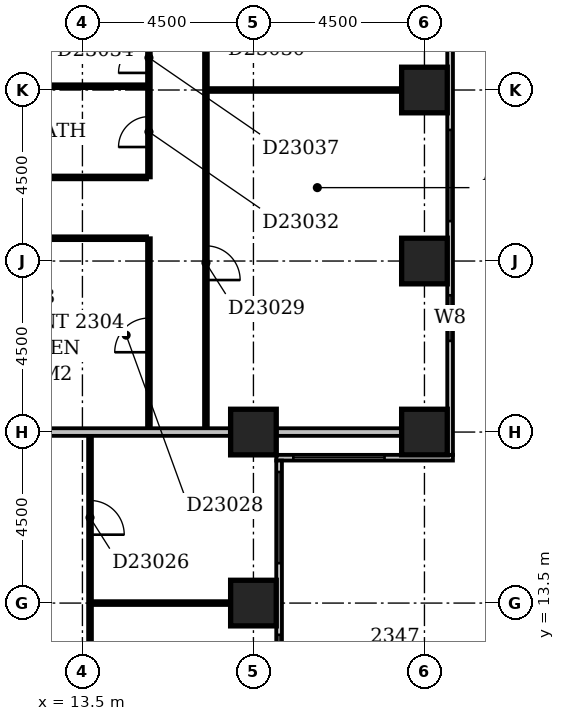
"""IFC4 building model, lengths in metres.
Left out: names, types, materials, properties, quantities, classifications, styles, units other than length and angle.
Written with IfcOpenShell. Run it as: python <this file> out.ifc"""

import sys

from ifc_helpers import new_model, si_unit, direction, frame, frame_2d, origin, origin_2d, place, context, subcontext, project, spatial, rectangle, extrude, element, fill, save


model = new_model("IFC4")
c1 = context("Model", 3, precision=1e-05, world=origin(), true_north=direction((0.0, 1.0)))
c2 = subcontext(c1, "Body", "Model", "MODEL_VIEW")
j1 = project(units=[si_unit("LENGTHUNIT", "METRE"), si_unit("PLANEANGLEUNIT", "RADIAN")], contexts=[c1])
p1 = place(None, origin())
s1 = spatial("IfcSite", under=j1, at=p1, CompositionType="ELEMENT")
p2 = place(p1, origin())
s2 = spatial("IfcBuilding", under=s1, at=p2, CompositionType="ELEMENT")
p3 = place(p2, frame((0.0, 0.0, 93.8)))
s3 = spatial("IfcBuildingStorey", under=s2, at=p3, CompositionType="ELEMENT", Elevation=93.8)
for number, where, z_axis, x_axis in (
    (1, (18.0, 13.5, -0.3), (0.0, 0.0, 1.0), (1.0, 0.0, 0.0)),
    (2, (18.0, 18.0, -0.3), (0.0, 0.0, 1.0), (1.0, 0.0, 0.0)),
    (3, (22.5, 18.0, -0.3), (0.0, 0.0, 1.0), (1.0, 0.0, 0.0)),
    (4, (22.5, 22.5, -0.3), (0.0, 0.0, 1.0), (1.0, 0.0, 0.0)),
    (5, (22.5, 27.0, -0.3), (0.0, 0.0, 1.0), (1.0, 0.0, 0.0)),
):
    element("IfcColumn", number, at=place(p3, frame(where, z_axis=z_axis, x_axis=x_axis)), inside=s3, PredefinedType="COLUMN", context=c2, shape_type="SweptSolid", body=[
        extrude(rectangle(XDim=1.2, YDim=1.2, at=origin_2d()), origin(), (0.0, 0.0, 1.0), 3.6),
    ])
p4 = place(p3, frame((18.675, 8.4, 0.0), z_axis=(0.0, 0.0, 1.0), x_axis=(0.0, 1.0, 0.0)))
e6 = element("IfcWall", 6, at=p4, inside=s3, PredefinedType="STANDARD", context=c2, shape_type="SweptSolid", body=[
    extrude(rectangle(XDim=8.85, YDim=0.15, at=frame_2d((4.425, 0.0))), origin(), (0.0, 0.0, 1.0), 2.7),
])
p5 = place(p4, frame((1.865, 0.0, 0.6)))
e7 = element("IfcOpeningElement", 7, at=p5, cuts=e6, PredefinedType="OPENING", context=c2, shape_type="SweptSolid", body=[
    extrude(rectangle(XDim=2.4, YDim=1.8, at=frame_2d((1.2, 0.9))), frame((0.0, 0.087, 0.0), z_axis=(0.0, -1.0, 0.0), x_axis=(1.0, 0.0, 0.0)), (0.0, 0.0, 1.0), 0.174),
])
p6 = place(p4, frame((6.15, 0.0, 0.6)))
e8 = element("IfcOpeningElement", 8, at=p6, cuts=e6, PredefinedType="OPENING", context=c2, shape_type="SweptSolid", body=[
    extrude(rectangle(XDim=2.4, YDim=1.8, at=frame_2d((1.2, 0.9))), frame((0.0, 0.087, 0.0), z_axis=(0.0, -1.0, 0.0), x_axis=(1.0, 0.0, 0.0)), (0.0, 0.0, 1.0), 0.174),
])
p7 = place(p3, frame((18.6, 17.325, 0.0), z_axis=(0.0, 0.0, 1.0), x_axis=(1.0, 0.0, 0.0)))
e9 = element("IfcWall", 9, at=p7, inside=s3, PredefinedType="STANDARD", context=c2, shape_type="SweptSolid", body=[
    extrude(rectangle(XDim=4.65, YDim=0.15, at=frame_2d((2.325, 0.0))), origin(), (0.0, 0.0, 1.0), 2.7),
])
p8 = place(p7, frame((0.45, 0.0, 0.6)))
e10 = element("IfcOpeningElement", 10, at=p8, cuts=e9, PredefinedType="OPENING", context=c2, shape_type="SweptSolid", body=[
    extrude(rectangle(XDim=2.4, YDim=1.8, at=frame_2d((1.2, 0.9))), frame((0.0, 0.087, 0.0), z_axis=(0.0, -1.0, 0.0), x_axis=(1.0, 0.0, 0.0)), (0.0, 0.0, 1.0), 0.174),
])
p9 = place(p3, frame((23.175, 17.4, 0.0), z_axis=(0.0, 0.0, 1.0), x_axis=(0.0, 1.0, 0.0)))
e11 = element("IfcWall", 11, at=p9, inside=s3, PredefinedType="STANDARD", context=c2, shape_type="SweptSolid", body=[
    extrude(rectangle(XDim=17.85, YDim=0.15, at=frame_2d((8.925, 0.0))), origin(), (0.0, 0.0, 1.0), 2.7),
])
p10 = place(p9, frame((2.999, 0.0, 0.6)))
e12 = element("IfcOpeningElement", 12, at=p10, cuts=e11, PredefinedType="OPENING", context=c2, shape_type="SweptSolid", body=[
    extrude(rectangle(XDim=1.2, YDim=1.8, at=frame_2d((0.6, 0.9))), frame((0.0, 0.087, 0.0), z_axis=(0.0, -1.0, 0.0), x_axis=(1.0, 0.0, 0.0)), (0.0, 0.0, 1.0), 0.174),
])
p11 = place(p9, frame((6.15, 0.0, 0.6)))
e13 = element("IfcOpeningElement", 13, at=p11, cuts=e11, PredefinedType="OPENING", context=c2, shape_type="SweptSolid", body=[
    extrude(rectangle(XDim=2.4, YDim=1.8, at=frame_2d((1.2, 0.9))), frame((0.0, 0.087, 0.0), z_axis=(0.0, -1.0, 0.0), x_axis=(1.0, 0.0, 0.0)), (0.0, 0.0, 1.0), 0.174),
])
p12 = place(p9, frame((10.65, 0.0, 0.6)))
e14 = element("IfcOpeningElement", 14, at=p12, cuts=e11, PredefinedType="OPENING", context=c2, shape_type="SweptSolid", body=[
    extrude(rectangle(XDim=2.4, YDim=1.8, at=frame_2d((1.2, 0.9))), frame((0.0, 0.087, 0.0), z_axis=(0.0, -1.0, 0.0), x_axis=(1.0, 0.0, 0.0)), (0.0, 0.0, 1.0), 0.174),
])
p13 = place(p9, frame((15.043, 0.0, 0.6)))
e15 = element("IfcOpeningElement", 15, at=p13, cuts=e11, PredefinedType="OPENING", context=c2, shape_type="SweptSolid", body=[
    extrude(rectangle(XDim=2.1, YDim=1.8, at=frame_2d((1.05, 0.9))), frame((0.0, 0.087, 0.0), z_axis=(0.0, -1.0, 0.0), x_axis=(1.0, 0.0, 0.0)), (0.0, 0.0, 1.0), 0.174),
])
p14 = place(p3, frame((13.7, 9.6, 0.0), z_axis=(0.0, 0.0, 1.0), x_axis=(0.0, 1.0, 0.0)))
e16 = element("IfcWall", 16, at=p14, inside=s3, PredefinedType="PARTITIONING", context=c2, shape_type="SweptSolid", body=[
    extrude(rectangle(XDim=8.3, YDim=0.1, at=frame_2d((4.15, 0.0))), origin(), (0.0, 0.0, 1.0), 3.3),
])
p15 = place(p14, frame((1.2, 0.0, 0.0)))
e17 = element("IfcOpeningElement", 17, at=p15, cuts=e16, PredefinedType="OPENING", context=c2, shape_type="SweptSolid", body=[
    extrude(rectangle(XDim=0.9, YDim=2.1, at=frame_2d((0.45, 1.05))), frame((0.0, 0.062, 0.0), z_axis=(0.0, -1.0, 0.0), x_axis=(1.0, 0.0, 0.0)), (0.0, 0.0, 1.0), 0.124),
])
p16 = place(p14, frame((5.7, 0.0, 0.0)))
e18 = element("IfcOpeningElement", 18, at=p16, cuts=e16, PredefinedType="OPENING", context=c2, shape_type="SweptSolid", body=[
    extrude(rectangle(XDim=0.9, YDim=2.1, at=frame_2d((0.45, 1.05))), frame((0.0, 0.062, 0.0), z_axis=(0.0, -1.0, 0.0), x_axis=(1.0, 0.0, 0.0)), (0.0, 0.0, 1.0), 0.124),
])
p17 = place(p3, frame((13.75, 13.5, 0.0), z_axis=(0.0, 0.0, 1.0), x_axis=(1.0, 0.0, 0.0)))
e19 = element("IfcWall", 19, at=p17, inside=s3, PredefinedType="PARTITIONING", context=c2, shape_type="SweptSolid", body=[
    extrude(rectangle(XDim=3.65, YDim=0.1, at=frame_2d((1.825, 0.0))), origin(), (0.0, 0.0, 1.0), 3.3),
])
p18 = place(p3, frame((9.1, 18.0, 0.0), z_axis=(0.0, 0.0, 1.0), x_axis=(1.0, 0.0, 0.0)))
e20 = element("IfcWall", 20, at=p18, inside=s3, PredefinedType="PARTITIONING", context=c2, shape_type="SweptSolid", body=[
    extrude(rectangle(XDim=8.3, YDim=0.2, at=frame_2d((4.15, 0.0))), origin(), (0.0, 0.0, 1.0), 2.6),
])
p19 = place(p3, frame((18.6, 18.0, 0.0), z_axis=(0.0, 0.0, 1.0), x_axis=(1.0, 0.0, 0.0)))
e21 = element("IfcWall", 21, at=p19, inside=s3, PredefinedType="PARTITIONING", context=c2, shape_type="SweptSolid", body=[
    extrude(rectangle(XDim=3.3, YDim=0.2, at=frame_2d((1.65, 0.0))), origin(), (0.0, 0.0, 1.0), 2.7),
])
p20 = place(p3, frame((15.25, 18.1, 0.0), z_axis=(0.0, 0.0, 1.0), x_axis=(0.0, 1.0, 0.0)))
e22 = element("IfcWall", 22, at=p20, inside=s3, PredefinedType="PARTITIONING", context=c2, shape_type="SweptSolid", body=[
    extrude(rectangle(XDim=5.0, YDim=0.1, at=frame_2d((2.5, 0.0))), origin(), (0.0, 0.0, 1.0), 3.3),
])
p21 = place(p20, frame((2.0, 0.0, 0.0)))
e23 = element("IfcOpeningElement", 23, at=p21, cuts=e22, PredefinedType="OPENING", context=c2, shape_type="SweptSolid", body=[
    extrude(rectangle(XDim=0.9, YDim=2.1, at=frame_2d((0.45, 1.05))), frame((0.0, 0.062, 0.0), z_axis=(0.0, -1.0, 0.0), x_axis=(1.0, 0.0, 0.0)), (0.0, 0.0, 1.0), 0.124),
])
p22 = place(p3, frame((16.75, 18.1, 0.0), z_axis=(0.0, 0.0, 1.0), x_axis=(0.0, 1.0, 0.0)))
e24 = element("IfcWall", 24, at=p22, inside=s3, PredefinedType="PARTITIONING", context=c2, shape_type="SweptSolid", body=[
    extrude(rectangle(XDim=17.8, YDim=0.1, at=frame_2d((8.9, 0.0))), origin(), (0.0, 0.0, 1.0), 3.3),
])
p23 = place(p22, frame((3.9, 0.0, 0.0)))
e25 = element("IfcOpeningElement", 25, at=p23, cuts=e24, PredefinedType="OPENING", context=c2, shape_type="SweptSolid", body=[
    extrude(rectangle(XDim=0.9, YDim=2.1, at=frame_2d((0.45, 1.05))), frame((0.0, 0.062, 0.0), z_axis=(0.0, -1.0, 0.0), x_axis=(1.0, 0.0, 0.0)), (0.0, 0.0, 1.0), 0.124),
])
p24 = place(p22, frame((10.7, 0.0, 0.0)))
e26 = element("IfcOpeningElement", 26, at=p24, cuts=e24, PredefinedType="OPENING", context=c2, shape_type="SweptSolid", body=[
    extrude(rectangle(XDim=0.9, YDim=2.1, at=frame_2d((0.45, 1.05))), frame((0.0, 0.062, 0.0), z_axis=(0.0, -1.0, 0.0), x_axis=(1.0, 0.0, 0.0)), (0.0, 0.0, 1.0), 0.124),
])
p25 = place(p22, frame((14.05, 0.0, 0.0)))
e27 = element("IfcOpeningElement", 27, at=p25, cuts=e24, PredefinedType="OPENING", context=c2, shape_type="SweptSolid", body=[
    extrude(rectangle(XDim=0.9, YDim=2.1, at=frame_2d((0.45, 1.05))), frame((0.0, 0.062, 0.0), z_axis=(0.0, -1.0, 0.0), x_axis=(1.0, 0.0, 0.0)), (0.0, 0.0, 1.0), 0.124),
])
p26 = place(p3, frame((9.1, 23.1, 0.0), z_axis=(0.0, 0.0, 1.0), x_axis=(1.0, 0.0, 0.0)))
e28 = element("IfcWall", 28, at=p26, inside=s3, PredefinedType="PARTITIONING", context=c2, shape_type="SweptSolid", body=[
    extrude(rectangle(XDim=6.1, YDim=0.1, at=frame_2d((3.05, 0.0))), origin(), (0.0, 0.0, 1.0), 3.3),
])
p27 = place(p3, frame((9.1, 24.7, 0.0), z_axis=(0.0, 0.0, 1.0), x_axis=(1.0, 0.0, 0.0)))
e29 = element("IfcWall", 29, at=p27, inside=s3, PredefinedType="PLUMBINGWALL", context=c2, shape_type="SweptSolid", body=[
    extrude(rectangle(XDim=6.1, YDim=0.1, at=frame_2d((3.05, 0.0))), origin(), (0.0, 0.0, 1.0), 3.3),
])
p28 = place(p3, frame((15.25, 24.7, 0.0), z_axis=(0.0, 0.0, 1.0), x_axis=(0.0, 1.0, 0.0)))
e30 = element("IfcWall", 30, at=p28, inside=s3, PredefinedType="PARTITIONING", context=c2, shape_type="SweptSolid", body=[
    extrude(rectangle(XDim=11.2, YDim=0.1, at=frame_2d((5.6, 0.0))), origin(), (0.0, 0.0, 1.0), 3.3),
])
p29 = place(p28, frame((0.8, 0.0, 0.0)))
e31 = element("IfcOpeningElement", 31, at=p29, cuts=e30, PredefinedType="OPENING", context=c2, shape_type="SweptSolid", body=[
    extrude(rectangle(XDim=0.8, YDim=2.1, at=frame_2d((0.4, 1.05))), frame((0.0, 0.062, 0.0), z_axis=(0.0, -1.0, 0.0), x_axis=(1.0, 0.0, 0.0)), (0.0, 0.0, 1.0), 0.124),
])
p30 = place(p28, frame((8.1, 0.0, 0.0)))
e32 = element("IfcOpeningElement", 32, at=p30, cuts=e30, PredefinedType="OPENING", context=c2, shape_type="SweptSolid", body=[
    extrude(rectangle(XDim=0.8, YDim=2.1, at=frame_2d((0.4, 1.05))), frame((0.0, 0.062, 0.0), z_axis=(0.0, -1.0, 0.0), x_axis=(1.0, 0.0, 0.0)), (0.0, 0.0, 1.0), 0.124),
])
p31 = place(p28, frame((4.3, 0.0, 0.0)))
e33 = element("IfcOpeningElement", 33, at=p31, cuts=e30, PredefinedType="OPENING", context=c2, shape_type="SweptSolid", body=[
    extrude(rectangle(XDim=0.8, YDim=2.1, at=frame_2d((0.4, 1.05))), frame((0.0, 0.062, 0.0), z_axis=(0.0, -1.0, 0.0), x_axis=(1.0, 0.0, 0.0)), (0.0, 0.0, 1.0), 0.124),
])
p32 = place(p28, frame((6.1, 0.0, 0.0)))
e34 = element("IfcOpeningElement", 34, at=p32, cuts=e30, PredefinedType="OPENING", context=c2, shape_type="SweptSolid", body=[
    extrude(rectangle(XDim=0.8, YDim=2.1, at=frame_2d((0.4, 1.05))), frame((0.0, 0.062, 0.0), z_axis=(0.0, -1.0, 0.0), x_axis=(1.0, 0.0, 0.0)), (0.0, 0.0, 1.0), 0.124),
])
p33 = place(p28, frame((10.0, 0.0, 0.0)))
e35 = element("IfcOpeningElement", 35, at=p33, cuts=e30, PredefinedType="OPENING", context=c2, shape_type="SweptSolid", body=[
    extrude(rectangle(XDim=0.8, YDim=2.1, at=frame_2d((0.4, 1.05))), frame((0.0, 0.062, 0.0), z_axis=(0.0, -1.0, 0.0), x_axis=(1.0, 0.0, 0.0)), (0.0, 0.0, 1.0), 0.124),
])
p34 = place(p28, frame((2.75, 0.0, 0.0)))
e36 = element("IfcOpeningElement", 36, at=p34, cuts=e30, PredefinedType="OPENING", context=c2, shape_type="SweptSolid", body=[
    extrude(rectangle(XDim=0.8, YDim=2.1, at=frame_2d((0.4, 1.05))), frame((0.0, 0.062, 0.0), z_axis=(0.0, -1.0, 0.0), x_axis=(1.0, 0.0, 0.0)), (0.0, 0.0, 1.0), 0.124),
])
p35 = place(p3, frame((16.8, 27.0, 0.0), z_axis=(0.0, 0.0, 1.0), x_axis=(1.0, 0.0, 0.0)))
e37 = element("IfcWall", 37, at=p35, inside=s3, PredefinedType="PARTITIONING", context=c2, shape_type="SweptSolid", body=[
    extrude(rectangle(XDim=5.1, YDim=0.1, at=frame_2d((2.55, 0.0))), origin(), (0.0, 0.0, 1.0), 2.7),
])
p36 = place(p3, frame((9.1, 27.1, 0.0), z_axis=(0.0, 0.0, 1.0), x_axis=(1.0, 0.0, 0.0)))
e38 = element("IfcWall", 38, at=p36, inside=s3, PredefinedType="PLUMBINGWALL", context=c2, shape_type="SweptSolid", body=[
    extrude(rectangle(XDim=6.1, YDim=0.1, at=frame_2d((3.05, 0.0))), origin(), (0.0, 0.0, 1.0), 2.7),
])
p37 = place(p5, origin())
e39 = element("IfcWindow", 39, at=p37, inside=s3, PartitioningType="SINGLE_PANEL", PredefinedType="WINDOW", context=c2, shape_type="SweptSolid", body=[
    extrude(rectangle(XDim=2.4, YDim=1.8, at=frame_2d((1.2, 0.9))), frame((0.0, 0.03, 0.0), z_axis=(0.0, -1.0, 0.0), x_axis=(1.0, 0.0, 0.0)), (0.0, 0.0, 1.0), 0.06),
])
fill(e7, e39)
p38 = place(p6, origin())
e40 = element("IfcWindow", 40, at=p38, inside=s3, PartitioningType="SINGLE_PANEL", PredefinedType="WINDOW", context=c2, shape_type="SweptSolid", body=[
    extrude(rectangle(XDim=2.4, YDim=1.8, at=frame_2d((1.2, 0.9))), frame((0.0, 0.03, 0.0), z_axis=(0.0, -1.0, 0.0), x_axis=(1.0, 0.0, 0.0)), (0.0, 0.0, 1.0), 0.06),
])
fill(e8, e40)
p39 = place(p8, origin())
e41 = element("IfcWindow", 41, at=p39, inside=s3, PartitioningType="SINGLE_PANEL", PredefinedType="WINDOW", context=c2, shape_type="SweptSolid", body=[
    extrude(rectangle(XDim=2.4, YDim=1.8, at=frame_2d((1.2, 0.9))), frame((0.0, 0.03, 0.0), z_axis=(0.0, -1.0, 0.0), x_axis=(1.0, 0.0, 0.0)), (0.0, 0.0, 1.0), 0.06),
])
fill(e10, e41)
p40 = place(p10, origin())
e42 = element("IfcWindow", 42, at=p40, inside=s3, PartitioningType="SINGLE_PANEL", PredefinedType="WINDOW", context=c2, shape_type="SweptSolid", body=[
    extrude(rectangle(XDim=1.2, YDim=1.8, at=frame_2d((0.6, 0.9))), frame((0.0, 0.03, 0.0), z_axis=(0.0, -1.0, 0.0), x_axis=(1.0, 0.0, 0.0)), (0.0, 0.0, 1.0), 0.06),
])
fill(e12, e42)
p41 = place(p11, origin())
e43 = element("IfcWindow", 43, at=p41, inside=s3, PartitioningType="SINGLE_PANEL", PredefinedType="WINDOW", context=c2, shape_type="SweptSolid", body=[
    extrude(rectangle(XDim=2.4, YDim=1.8, at=frame_2d((1.2, 0.9))), frame((0.0, 0.03, 0.0), z_axis=(0.0, -1.0, 0.0), x_axis=(1.0, 0.0, 0.0)), (0.0, 0.0, 1.0), 0.06),
])
fill(e13, e43)
p42 = place(p16, frame((0.9, 0.0, 0.0), z_axis=(0.0, 0.0, 1.0), x_axis=(-1.0, 0.0, 0.0)))
e44 = element("IfcDoor", 44, at=p42, inside=s3, OperationType="SINGLE_SWING_RIGHT", PredefinedType="DOOR", context=c2, shape_type="SweptSolid", body=[
    extrude(rectangle(XDim=0.9, YDim=2.1, at=frame_2d((0.45, 1.05))), frame((0.0, 0.025, 0.0), z_axis=(0.0, -1.0, 0.0), x_axis=(1.0, 0.0, 0.0)), (0.0, 0.0, 1.0), 0.05),
])
fill(e18, e44)
p43 = place(p21, origin())
e45 = element("IfcDoor", 45, at=p43, inside=s3, OperationType="SINGLE_SWING_LEFT", PredefinedType="DOOR", context=c2, shape_type="SweptSolid", body=[
    extrude(rectangle(XDim=0.9, YDim=2.1, at=frame_2d((0.45, 1.05))), frame((0.0, 0.025, 0.0), z_axis=(0.0, -1.0, 0.0), x_axis=(1.0, 0.0, 0.0)), (0.0, 0.0, 1.0), 0.05),
])
fill(e23, e45)
p44 = place(p23, frame((0.9, 0.0, 0.0), z_axis=(0.0, 0.0, 1.0), x_axis=(-1.0, 0.0, 0.0)))
e46 = element("IfcDoor", 46, at=p44, inside=s3, OperationType="SINGLE_SWING_RIGHT", PredefinedType="DOOR", context=c2, shape_type="SweptSolid", body=[
    extrude(rectangle(XDim=0.9, YDim=2.1, at=frame_2d((0.45, 1.05))), frame((0.0, 0.025, 0.0), z_axis=(0.0, -1.0, 0.0), x_axis=(1.0, 0.0, 0.0)), (0.0, 0.0, 1.0), 0.05),
])
fill(e25, e46)
p45 = place(p29, origin())
e47 = element("IfcDoor", 47, at=p45, inside=s3, OperationType="SINGLE_SWING_LEFT", PredefinedType="DOOR", context=c2, shape_type="SweptSolid", body=[
    extrude(rectangle(XDim=0.8, YDim=2.1, at=frame_2d((0.4, 1.05))), frame((0.0, 0.025, 0.0), z_axis=(0.0, -1.0, 0.0), x_axis=(1.0, 0.0, 0.0)), (0.0, 0.0, 1.0), 0.05),
])
fill(e31, e47)
p46 = place(p34, origin())
e48 = element("IfcDoor", 48, at=p46, inside=s3, OperationType="SINGLE_SWING_LEFT", PredefinedType="DOOR", context=c2, shape_type="SweptSolid", body=[
    extrude(rectangle(XDim=0.8, YDim=2.1, at=frame_2d((0.4, 1.05))), frame((0.0, 0.025, 0.0), z_axis=(0.0, -1.0, 0.0), x_axis=(1.0, 0.0, 0.0)), (0.0, 0.0, 1.0), 0.05),
])
fill(e36, e48)
save(model, sys.argv[1])
